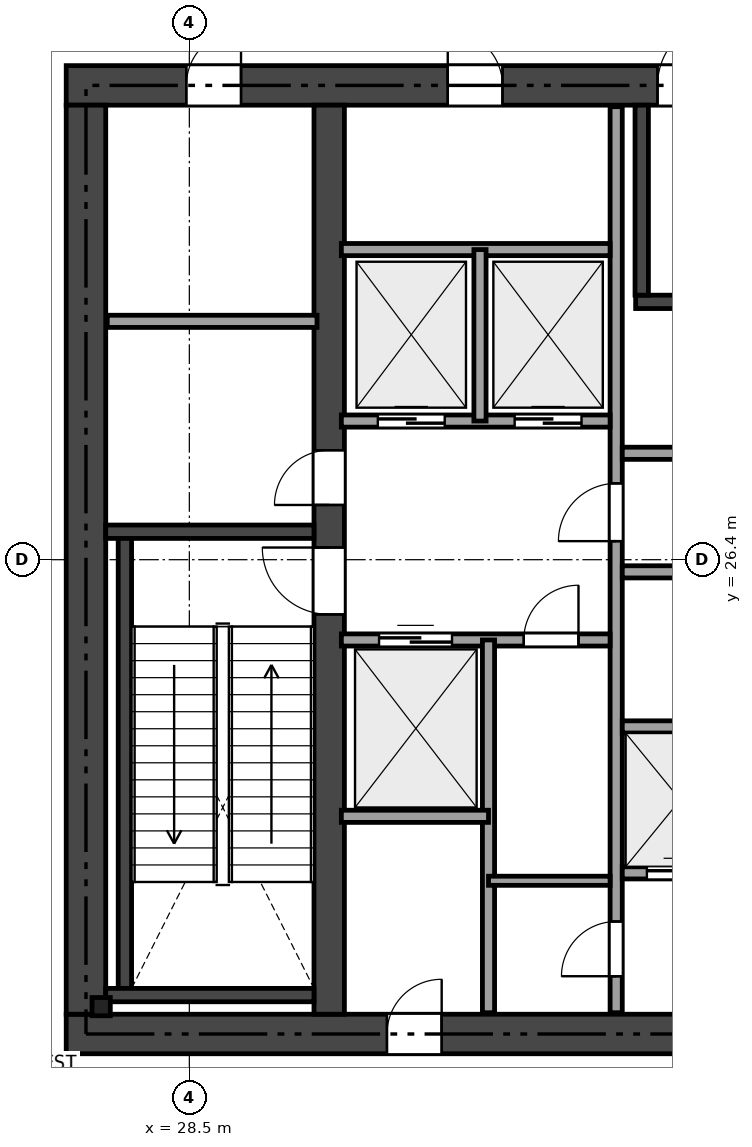
"""IFC4 building model, lengths in metres.
Left out: names, types, materials, properties, quantities, classifications, styles, units other than length and angle.
Written with IfcOpenShell. Run it as: python <this file> out.ifc"""

import sys

from ifc_helpers import new_model, si_unit, direction, frame, frame_2d, origin, origin_2d, place, context, subcontext, project, spatial, rectangle, i_section, extrude, element, fill, save


model = new_model("IFC4")
c1 = context("Model", 3, precision=1e-05, world=origin(), true_north=direction((0.0, 1.0)))
c2 = subcontext(c1, "Body", "Model", "MODEL_VIEW")
j1 = project(units=[si_unit("LENGTHUNIT", "METRE"), si_unit("PLANEANGLEUNIT", "RADIAN")], contexts=[c1])
p1 = place(None, origin())
s1 = spatial("IfcSite", under=j1, at=p1, CompositionType="ELEMENT")
p2 = place(p1, origin())
s2 = spatial("IfcBuilding", under=s1, at=p2, CompositionType="ELEMENT")
p3 = place(p2, frame((0.0, 0.0, 5.4)))
s3 = spatial("IfcBuildingStorey", under=s2, at=p3, CompositionType="ELEMENT", Elevation=5.4)
p4 = place(p3, frame((26.475, 18.6, 0.0), z_axis=(0.0, 0.0, 1.0), x_axis=(1.0, 0.0, 0.0)))
e1 = element("IfcWall", 1, at=p4, inside=s3, PredefinedType="SHEAR", context=c2, shape_type="SweptSolid", body=[
    extrude(rectangle(XDim=21.45, YDim=0.65, at=frame_2d((10.725, 0.0))), origin(), (0.0, 0.0, 1.0), 5.05),
])
p5 = place(p4, frame((12.45, 0.0, 0.0)))
e2 = element("IfcOpeningElement", 2, at=p5, cuts=e1, PredefinedType="OPENING", context=c2, shape_type="SweptSolid", body=[
    extrude(rectangle(XDim=1.15, YDim=2.15, at=frame_2d((0.575, 1.075))), frame((0.0, 0.335, 0.0), z_axis=(0.0, -1.0, 0.0), x_axis=(1.0, 0.0, 0.0)), (0.0, 0.0, 1.0), 0.67),
])
p6 = place(p4, frame((5.275, 0.0, 0.0)))
e3 = element("IfcOpeningElement", 3, at=p6, cuts=e1, PredefinedType="OPENING", context=c2, shape_type="SweptSolid", body=[
    extrude(rectangle(XDim=0.9, YDim=2.1, at=frame_2d((0.45, 1.05))), frame((0.0, 0.335, 0.0), z_axis=(0.0, -1.0, 0.0), x_axis=(1.0, 0.0, 0.0)), (0.0, 0.0, 1.0), 0.67),
])
p7 = place(p3, frame((26.475, 34.2, 0.0), z_axis=(0.0, 0.0, 1.0), x_axis=(1.0, 0.0, 0.0)))
e4 = element("IfcWall", 4, at=p7, inside=s3, PredefinedType="SHEAR", context=c2, shape_type="SweptSolid", body=[
    extrude(rectangle(XDim=21.45, YDim=0.65, at=frame_2d((10.725, 0.0))), origin(), (0.0, 0.0, 1.0), 5.05),
])
p8 = place(p7, frame((9.725, 0.0, 0.0)))
e5 = element("IfcOpeningElement", 5, at=p8, cuts=e4, PredefinedType="OPENING", context=c2, shape_type="SweptSolid", body=[
    extrude(rectangle(XDim=1.1, YDim=2.15, at=frame_2d((0.55, 1.075))), frame((0.0, 0.335, 0.0), z_axis=(0.0, -1.0, 0.0), x_axis=(1.0, 0.0, 0.0)), (0.0, 0.0, 1.0), 0.67),
])
p9 = place(p7, frame((1.975, 0.0, 0.0)))
e6 = element("IfcOpeningElement", 6, at=p9, cuts=e4, PredefinedType="OPENING", context=c2, shape_type="SweptSolid", body=[
    extrude(rectangle(XDim=0.9, YDim=2.1, at=frame_2d((0.45, 1.05))), frame((0.0, 0.335, 0.0), z_axis=(0.0, -1.0, 0.0), x_axis=(1.0, 0.0, 0.0)), (0.0, 0.0, 1.0), 0.67),
])
p10 = place(p7, frame((6.275, 0.0, 0.0)))
e7 = element("IfcOpeningElement", 7, at=p10, cuts=e4, PredefinedType="OPENING", context=c2, shape_type="SweptSolid", body=[
    extrude(rectangle(XDim=0.9, YDim=2.1, at=frame_2d((0.45, 1.05))), frame((0.0, 0.335, 0.0), z_axis=(0.0, -1.0, 0.0), x_axis=(1.0, 0.0, 0.0)), (0.0, 0.0, 1.0), 0.67),
])
p11 = place(p3, frame((26.8, 18.925, 0.0), z_axis=(0.0, 0.0, 1.0), x_axis=(0.0, 1.0, 0.0)))
e8 = element("IfcWall", 8, at=p11, inside=s3, PredefinedType="SHEAR", context=c2, shape_type="SweptSolid", body=[
    extrude(rectangle(XDim=14.95, YDim=0.65, at=frame_2d((7.475, 0.0))), origin(), (0.0, 0.0, 1.0), 5.05),
])
p12 = place(p3, frame((30.8, 18.925, 0.0), z_axis=(0.0, 0.0, 1.0), x_axis=(0.0, 1.0, 0.0)))
e9 = element("IfcWall", 9, at=p12, inside=s3, PredefinedType="SHEAR", context=c2, shape_type="SweptSolid", body=[
    extrude(rectangle(XDim=14.95, YDim=0.5, at=frame_2d((7.475, 0.0))), origin(), (0.0, 0.0, 1.0), 5.05),
])
p13 = place(p12, frame((6.575, 0.0, 0.0)))
e10 = element("IfcOpeningElement", 10, at=p13, cuts=e9, PredefinedType="OPENING", context=c2, shape_type="SweptSolid", body=[
    extrude(rectangle(XDim=1.1, YDim=2.15, at=frame_2d((0.55, 1.075))), frame((0.0, 0.26, 0.0), z_axis=(0.0, -1.0, 0.0), x_axis=(1.0, 0.0, 0.0)), (0.0, 0.0, 1.0), 0.52),
])
p14 = place(p12, frame((8.375, 0.0, 0.0)))
e11 = element("IfcOpeningElement", 11, at=p14, cuts=e9, PredefinedType="OPENING", context=c2, shape_type="SweptSolid", body=[
    extrude(rectangle(XDim=0.9, YDim=2.1, at=frame_2d((0.45, 1.05))), frame((0.0, 0.26, 0.0), z_axis=(0.0, -1.0, 0.0), x_axis=(1.0, 0.0, 0.0)), (0.0, 0.0, 1.0), 0.52),
])
p15 = place(p3, frame((27.125, 26.86, 0.0), z_axis=(0.0, 0.0, 1.0), x_axis=(1.0, 0.0, 0.0)))
e12 = element("IfcWall", 12, at=p15, inside=s3, PredefinedType="SHEAR", context=c2, shape_type="SweptSolid", body=[
    extrude(rectangle(XDim=3.425, YDim=0.22, at=frame_2d((1.712, 0.0))), origin(), (0.0, 0.0, 1.0), 5.05),
])
p16 = place(p3, frame((27.44, 19.35, 0.0), z_axis=(0.0, 0.0, 1.0), x_axis=(0.0, 1.0, 0.0)))
e13 = element("IfcWall", 13, at=p16, inside=s3, PredefinedType="SHEAR", context=c2, shape_type="SweptSolid", body=[
    extrude(rectangle(XDim=7.4, YDim=0.22, at=frame_2d((3.7, 0.0))), origin(), (0.0, 0.0, 1.0), 5.05),
])
p17 = place(p3, frame((27.125, 19.24, 0.0), z_axis=(0.0, 0.0, 1.0), x_axis=(1.0, 0.0, 0.0)))
e14 = element("IfcWall", 14, at=p17, inside=s3, PredefinedType="SHEAR", context=c2, shape_type="SweptSolid", body=[
    extrude(rectangle(XDim=3.425, YDim=0.22, at=frame_2d((1.712, 0.0))), origin(), (0.0, 0.0, 1.0), 5.05),
])
p18 = place(p3, frame((35.84, 30.64, 0.0), z_axis=(0.0, 0.0, 1.0), x_axis=(1.0, 0.0, 0.0)))
e15 = element("IfcWall", 15, at=p18, inside=s3, PredefinedType="SHEAR", context=c2, shape_type="SweptSolid", body=[
    extrude(rectangle(XDim=7.61, YDim=0.22, at=frame_2d((3.805, 0.0))), origin(), (0.0, 0.0, 1.0), 5.05),
])
p19 = place(p3, frame((35.94, 30.75, 0.0), z_axis=(0.0, 0.0, 1.0), x_axis=(0.0, 1.0, 0.0)))
e16 = element("IfcWall", 16, at=p19, inside=s3, PredefinedType="SHEAR", context=c2, shape_type="SweptSolid", body=[
    extrude(rectangle(XDim=3.125, YDim=0.22, at=frame_2d((1.562, 0.0))), origin(), (0.0, 0.0, 1.0), 5.05),
])
p20 = place(p3, frame((27.05, 19.05, 0.0), z_axis=(0.0, 0.0, 1.0), x_axis=(1.0, 0.0, 0.0)))
e17 = element("IfcColumn", 17, at=p20, inside=s3, PredefinedType="PILASTER", context=c2, shape_type="SweptSolid", body=[
    extrude(i_section(OverallWidth=0.3, OverallDepth=0.3, WebThickness=0.011, FlangeThickness=0.019, at=origin_2d()), origin(), (0.0, 0.0, 1.0), 5.05),
])
p21 = place(p3, frame((27.15, 30.32, 0.0), z_axis=(0.0, 0.0, 1.0), x_axis=(1.0, 0.0, 0.0)))
e18 = element("IfcWall", 18, at=p21, inside=s3, PredefinedType="SOLIDWALL", context=c2, shape_type="SweptSolid", body=[
    extrude(rectangle(XDim=3.45, YDim=0.2, at=frame_2d((1.725, 0.0))), origin(), (0.0, 0.0, 1.0), 5.05),
])
p22 = place(p3, frame((35.52, 18.95, 0.0), z_axis=(0.0, 0.0, 1.0), x_axis=(0.0, 1.0, 0.0)))
e19 = element("IfcWall", 19, at=p22, inside=s3, PredefinedType="SOLIDWALL", context=c2, shape_type="SweptSolid", body=[
    extrude(rectangle(XDim=14.9, YDim=0.2, at=frame_2d((7.45, 0.0))), origin(), (0.0, 0.0, 1.0), 4.571),
])
p23 = place(p22, frame((7.755, 0.0, 0.0)))
e20 = element("IfcOpeningElement", 20, at=p23, cuts=e19, PredefinedType="OPENING", context=c2, shape_type="SweptSolid", body=[
    extrude(rectangle(XDim=0.95, YDim=2.15, at=frame_2d((0.475, 1.075))), frame((0.0, 0.11, 0.0), z_axis=(0.0, -1.0, 0.0), x_axis=(1.0, 0.0, 0.0)), (0.0, 0.0, 1.0), 0.22),
])
p24 = place(p22, frame((0.6, 0.0, 0.0)))
e21 = element("IfcOpeningElement", 21, at=p24, cuts=e19, PredefinedType="OPENING", context=c2, shape_type="SweptSolid", body=[
    extrude(rectangle(XDim=0.9, YDim=2.1, at=frame_2d((0.45, 1.05))), frame((0.0, 0.11, 0.0), z_axis=(0.0, -1.0, 0.0), x_axis=(1.0, 0.0, 0.0)), (0.0, 0.0, 1.0), 0.22),
])
p25 = place(p3, frame((31.0, 28.68, 0.0), z_axis=(0.0, 0.0, 1.0), x_axis=(1.0, 0.0, 0.0)))
e22 = element("IfcWall", 22, at=p25, inside=s3, PredefinedType="SOLIDWALL", context=c2, shape_type="SweptSolid", body=[
    extrude(rectangle(XDim=4.42, YDim=0.2, at=frame_2d((2.21, 0.0))), origin(), (0.0, 0.0, 1.0), 5.05),
])
p26 = place(p25, frame((0.6, 0.0, 0.0)))
e23 = element("IfcOpeningElement", 23, at=p26, cuts=e22, PredefinedType="OPENING", context=c2, shape_type="SweptSolid", body=[
    extrude(rectangle(XDim=1.1, YDim=2.15, at=frame_2d((0.55, 1.075))), frame((0.0, 0.11, 0.0), z_axis=(0.0, -1.0, 0.0), x_axis=(1.0, 0.0, 0.0)), (0.0, 0.0, 1.0), 0.22),
])
p27 = place(p25, frame((2.85, 0.0, 0.0)))
e24 = element("IfcOpeningElement", 24, at=p27, cuts=e22, PredefinedType="OPENING", context=c2, shape_type="SweptSolid", body=[
    extrude(rectangle(XDim=1.1, YDim=2.15, at=frame_2d((0.55, 1.075))), frame((0.0, 0.11, 0.0), z_axis=(0.0, -1.0, 0.0), x_axis=(1.0, 0.0, 0.0)), (0.0, 0.0, 1.0), 0.22),
])
p28 = place(p3, frame((31.0, 31.5, 0.0), z_axis=(0.0, 0.0, 1.0), x_axis=(1.0, 0.0, 0.0)))
e25 = element("IfcWall", 25, at=p28, inside=s3, PredefinedType="SOLIDWALL", context=c2, shape_type="SweptSolid", body=[
    extrude(rectangle(XDim=4.42, YDim=0.2, at=frame_2d((2.21, 0.0))), origin(), (0.0, 0.0, 1.0), 5.05),
])
p29 = place(p3, frame((33.28, 28.68, 0.0), z_axis=(0.0, 0.0, 1.0), x_axis=(0.0, 1.0, 0.0)))
e26 = element("IfcWall", 26, at=p29, inside=s3, PredefinedType="SOLIDWALL", context=c2, shape_type="SweptSolid", body=[
    extrude(rectangle(XDim=2.82, YDim=0.2, at=frame_2d((1.41, 0.0))), origin(), (0.0, 0.0, 1.0), 5.05),
])
p30 = place(p3, frame((31.0, 25.08, 0.0), z_axis=(0.0, 0.0, 1.0), x_axis=(1.0, 0.0, 0.0)))
e27 = element("IfcWall", 27, at=p30, inside=s3, PredefinedType="SOLIDWALL", context=c2, shape_type="SweptSolid", body=[
    extrude(rectangle(XDim=4.42, YDim=0.2, at=frame_2d((2.21, 0.0))), origin(), (0.0, 0.0, 1.0), 5.05),
])
p31 = place(p30, frame((3.0, 0.0, 0.0)))
e28 = element("IfcOpeningElement", 28, at=p31, cuts=e27, PredefinedType="OPENING", context=c2, shape_type="SweptSolid", body=[
    extrude(rectangle(XDim=0.9, YDim=2.1, at=frame_2d((0.45, 1.05))), frame((0.0, 0.11, 0.0), z_axis=(0.0, -1.0, 0.0), x_axis=(1.0, 0.0, 0.0)), (0.0, 0.0, 1.0), 0.22),
])
p32 = place(p30, frame((0.62, 0.0, 0.0)))
e29 = element("IfcOpeningElement", 29, at=p32, cuts=e27, PredefinedType="OPENING", context=c2, shape_type="SweptSolid", body=[
    extrude(rectangle(XDim=1.2, YDim=2.15, at=frame_2d((0.6, 1.075))), frame((0.0, 0.11, 0.0), z_axis=(0.0, -1.0, 0.0), x_axis=(1.0, 0.0, 0.0)), (0.0, 0.0, 1.0), 0.22),
])
p33 = place(p3, frame((33.42, 18.95, 0.0), z_axis=(0.0, 0.0, 1.0), x_axis=(0.0, 1.0, 0.0)))
e30 = element("IfcWall", 30, at=p33, inside=s3, PredefinedType="SOLIDWALL", context=c2, shape_type="SweptSolid", body=[
    extrude(rectangle(XDim=6.13, YDim=0.2, at=frame_2d((3.065, 0.0))), origin(), (0.0, 0.0, 1.0), 4.571),
])
p34 = place(p3, frame((31.0, 22.18, 0.0), z_axis=(0.0, 0.0, 1.0), x_axis=(1.0, 0.0, 0.0)))
e31 = element("IfcWall", 31, at=p34, inside=s3, PredefinedType="SOLIDWALL", context=c2, shape_type="SweptSolid", body=[
    extrude(rectangle(XDim=2.42, YDim=0.2, at=frame_2d((1.21, 0.0))), origin(), (0.0, 0.0, 1.0), 5.05),
])
p35 = place(p3, frame((33.42, 21.12, 0.0), z_axis=(0.0, 0.0, 1.0), x_axis=(1.0, 0.0, 0.0)))
e32 = element("IfcWall", 32, at=p35, inside=s3, PredefinedType="PARTITIONING", context=c2, shape_type="SweptSolid", body=[
    extrude(rectangle(XDim=2.0, YDim=0.15, at=frame_2d((1.0, 0.0))), origin(), (0.0, 0.0, 1.0), 5.05),
])
for number, where, z_axis, x_axis in (
    (33, (35.62, 28.15, 0.0), (0.0, 0.0, 1.0), (1.0, 0.0, 0.0)),
    (34, (35.62, 26.2, 0.0), (0.0, 0.0, 1.0), (1.0, 0.0, 0.0)),
):
    element("IfcWall", number, at=place(p3, frame(where, z_axis=z_axis, x_axis=x_axis)), inside=s3, PredefinedType="SOLIDWALL", context=c2, shape_type="SweptSolid", body=[
        extrude(rectangle(XDim=7.88, YDim=0.2, at=frame_2d((3.94, 0.0))), origin(), (0.0, 0.0, 1.0), 5.05),
    ])
p36 = place(p3, frame((35.62, 23.65, 0.0), z_axis=(0.0, 0.0, 1.0), x_axis=(1.0, 0.0, 0.0)))
e35 = element("IfcWall", 35, at=p36, inside=s3, PredefinedType="SOLIDWALL", context=c2, shape_type="SweptSolid", body=[
    extrude(rectangle(XDim=7.88, YDim=0.2, at=frame_2d((3.94, 0.0))), origin(), (0.0, 0.0, 1.0), 4.571),
])
p37 = place(p3, frame((35.62, 21.25, 0.0), z_axis=(0.0, 0.0, 1.0), x_axis=(1.0, 0.0, 0.0)))
e36 = element("IfcWall", 36, at=p37, inside=s3, PredefinedType="SOLIDWALL", context=c2, shape_type="SweptSolid", body=[
    extrude(rectangle(XDim=7.88, YDim=0.2, at=frame_2d((3.94, 0.0))), origin(), (0.0, 0.0, 1.0), 5.05),
])
p38 = place(p37, frame((0.405, 0.0, 0.0)))
e37 = element("IfcOpeningElement", 37, at=p38, cuts=e36, PredefinedType="OPENING", context=c2, shape_type="SweptSolid", body=[
    extrude(rectangle(XDim=1.1, YDim=2.15, at=frame_2d((0.55, 1.075))), frame((0.0, 0.11, 0.0), z_axis=(0.0, -1.0, 0.0), x_axis=(1.0, 0.0, 0.0)), (0.0, 0.0, 1.0), 0.22),
])
p39 = place(p37, frame((2.355, 0.0, 0.0)))
e38 = element("IfcOpeningElement", 38, at=p39, cuts=e36, PredefinedType="OPENING", context=c2, shape_type="SweptSolid", body=[
    extrude(rectangle(XDim=1.1, YDim=2.15, at=frame_2d((0.55, 1.075))), frame((0.0, 0.11, 0.0), z_axis=(0.0, -1.0, 0.0), x_axis=(1.0, 0.0, 0.0)), (0.0, 0.0, 1.0), 0.22),
])
p40 = place(p37, frame((4.305, 0.0, 0.0)))
e39 = element("IfcOpeningElement", 39, at=p40, cuts=e36, PredefinedType="OPENING", context=c2, shape_type="SweptSolid", body=[
    extrude(rectangle(XDim=1.1, YDim=2.15, at=frame_2d((0.55, 1.075))), frame((0.0, 0.11, 0.0), z_axis=(0.0, -1.0, 0.0), x_axis=(1.0, 0.0, 0.0)), (0.0, 0.0, 1.0), 0.22),
])
p41 = place(p37, frame((6.255, 0.0, 0.0)))
e40 = element("IfcOpeningElement", 40, at=p41, cuts=e36, PredefinedType="OPENING", context=c2, shape_type="SweptSolid", body=[
    extrude(rectangle(XDim=1.1, YDim=2.15, at=frame_2d((0.55, 1.075))), frame((0.0, 0.11, 0.0), z_axis=(0.0, -1.0, 0.0), x_axis=(1.0, 0.0, 0.0)), (0.0, 0.0, 1.0), 0.22),
])
p42 = place(p13, origin())
e41 = element("IfcDoor", 41, at=p42, inside=s3, OperationType="SINGLE_SWING_RIGHT", PredefinedType="DOOR", context=c2, shape_type="SweptSolid", body=[
    extrude(rectangle(XDim=1.1, YDim=2.15, at=frame_2d((0.55, 1.075))), frame((0.0, 0.025, 0.0), z_axis=(0.0, -1.0, 0.0), x_axis=(1.0, 0.0, 0.0)), (0.0, 0.0, 1.0), 0.05),
])
fill(e10, e41)
p43 = place(p8, origin())
e42 = element("IfcDoor", 42, at=p43, inside=s3, OperationType="SINGLE_SWING_RIGHT", PredefinedType="DOOR", context=c2, shape_type="SweptSolid", body=[
    extrude(rectangle(XDim=1.1, YDim=2.15, at=frame_2d((0.55, 1.075))), frame((0.0, 0.025, 0.0), z_axis=(0.0, -1.0, 0.0), x_axis=(1.0, 0.0, 0.0)), (0.0, 0.0, 1.0), 0.05),
])
fill(e5, e42)
p44 = place(p23, origin())
e43 = element("IfcDoor", 43, at=p44, inside=s3, OperationType="SINGLE_SWING_LEFT", PredefinedType="DOOR", context=c2, shape_type="SweptSolid", body=[
    extrude(rectangle(XDim=0.95, YDim=2.15, at=frame_2d((0.475, 1.075))), frame((0.0, 0.025, 0.0), z_axis=(0.0, -1.0, 0.0), x_axis=(1.0, 0.0, 0.0)), (0.0, 0.0, 1.0), 0.05),
])
fill(e20, e43)
p45 = place(p14, origin())
e44 = element("IfcDoor", 44, at=p45, inside=s3, OperationType="SINGLE_SWING_LEFT", PredefinedType="DOOR", context=c2, shape_type="SweptSolid", body=[
    extrude(rectangle(XDim=0.9, YDim=2.1, at=frame_2d((0.45, 1.05))), frame((0.0, 0.025, 0.0), z_axis=(0.0, -1.0, 0.0), x_axis=(1.0, 0.0, 0.0)), (0.0, 0.0, 1.0), 0.05),
])
fill(e11, e44)
p46 = place(p9, origin())
e45 = element("IfcDoor", 45, at=p46, inside=s3, OperationType="SINGLE_SWING_RIGHT", PredefinedType="DOOR", context=c2, shape_type="SweptSolid", body=[
    extrude(rectangle(XDim=0.9, YDim=2.1, at=frame_2d((0.45, 1.05))), frame((0.0, 0.025, 0.0), z_axis=(0.0, -1.0, 0.0), x_axis=(1.0, 0.0, 0.0)), (0.0, 0.0, 1.0), 0.05),
])
fill(e6, e45)
p47 = place(p10, origin())
e46 = element("IfcDoor", 46, at=p47, inside=s3, OperationType="SINGLE_SWING_LEFT", PredefinedType="DOOR", context=c2, shape_type="SweptSolid", body=[
    extrude(rectangle(XDim=0.9, YDim=2.1, at=frame_2d((0.45, 1.05))), frame((0.0, 0.025, 0.0), z_axis=(0.0, -1.0, 0.0), x_axis=(1.0, 0.0, 0.0)), (0.0, 0.0, 1.0), 0.05),
])
fill(e7, e46)
p48 = place(p6, origin())
e47 = element("IfcDoor", 47, at=p48, inside=s3, OperationType="SINGLE_SWING_RIGHT", PredefinedType="DOOR", context=c2, shape_type="SweptSolid", body=[
    extrude(rectangle(XDim=0.9, YDim=2.1, at=frame_2d((0.45, 1.05))), frame((0.0, 0.025, 0.0), z_axis=(0.0, -1.0, 0.0), x_axis=(1.0, 0.0, 0.0)), (0.0, 0.0, 1.0), 0.05),
])
fill(e3, e47)
p49 = place(p24, origin())
e48 = element("IfcDoor", 48, at=p49, inside=s3, OperationType="SINGLE_SWING_LEFT", PredefinedType="DOOR", context=c2, shape_type="SweptSolid", body=[
    extrude(rectangle(XDim=0.9, YDim=2.1, at=frame_2d((0.45, 1.05))), frame((0.0, 0.025, 0.0), z_axis=(0.0, -1.0, 0.0), x_axis=(1.0, 0.0, 0.0)), (0.0, 0.0, 1.0), 0.05),
])
fill(e21, e48)
p50 = place(p31, origin())
e49 = element("IfcDoor", 49, at=p50, inside=s3, OperationType="SINGLE_SWING_RIGHT", PredefinedType="DOOR", context=c2, shape_type="SweptSolid", body=[
    extrude(rectangle(XDim=0.9, YDim=2.1, at=frame_2d((0.45, 1.05))), frame((0.0, 0.025, 0.0), z_axis=(0.0, -1.0, 0.0), x_axis=(1.0, 0.0, 0.0)), (0.0, 0.0, 1.0), 0.05),
])
fill(e28, e49)
p51 = place(p26, origin())
e50 = element("IfcDoor", 50, at=p51, inside=s3, OperationType="SLIDING_TO_LEFT", PredefinedType="DOOR", context=c2, shape_type="SweptSolid", body=[
    extrude(rectangle(XDim=1.1, YDim=2.15, at=frame_2d((0.55, 1.075))), frame((0.0, 0.025, 0.0), z_axis=(0.0, -1.0, 0.0), x_axis=(1.0, 0.0, 0.0)), (0.0, 0.0, 1.0), 0.05),
])
fill(e23, e50)
p52 = place(p27, origin())
e51 = element("IfcDoor", 51, at=p52, inside=s3, OperationType="SLIDING_TO_LEFT", PredefinedType="DOOR", context=c2, shape_type="SweptSolid", body=[
    extrude(rectangle(XDim=1.1, YDim=2.15, at=frame_2d((0.55, 1.075))), frame((0.0, 0.025, 0.0), z_axis=(0.0, -1.0, 0.0), x_axis=(1.0, 0.0, 0.0)), (0.0, 0.0, 1.0), 0.05),
])
fill(e24, e51)
p53 = place(p32, origin())
e52 = element("IfcDoor", 52, at=p53, inside=s3, OperationType="SLIDING_TO_LEFT", PredefinedType="DOOR", context=c2, shape_type="SweptSolid", body=[
    extrude(rectangle(XDim=1.2, YDim=2.15, at=frame_2d((0.6, 1.075))), frame((0.0, 0.025, 0.0), z_axis=(0.0, -1.0, 0.0), x_axis=(1.0, 0.0, 0.0)), (0.0, 0.0, 1.0), 0.05),
])
fill(e29, e52)
p54 = place(p38, origin())
e53 = element("IfcDoor", 53, at=p54, inside=s3, OperationType="SLIDING_TO_LEFT", PredefinedType="DOOR", context=c2, shape_type="SweptSolid", body=[
    extrude(rectangle(XDim=1.1, YDim=2.15, at=frame_2d((0.55, 1.075))), frame((0.0, 0.025, 0.0), z_axis=(0.0, -1.0, 0.0), x_axis=(1.0, 0.0, 0.0)), (0.0, 0.0, 1.0), 0.05),
])
fill(e37, e53)
save(model, sys.argv[1])
